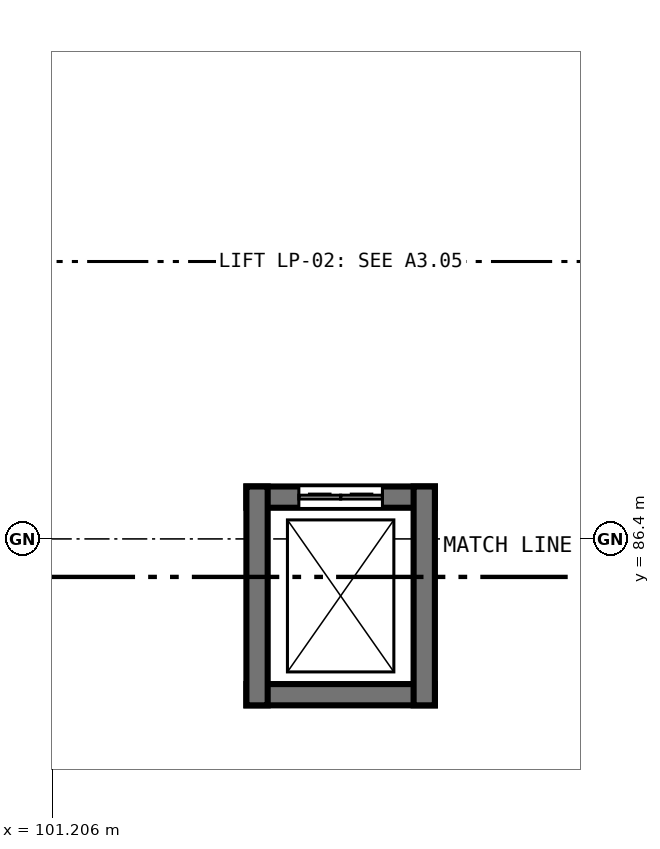
"""IFC4 building model, lengths in metres.
Left out: names, types, materials, properties, quantities, classifications, styles, units other than length and angle.
Written with IfcOpenShell. Run it as: python <this file> out.ifc"""

import sys

from ifc_helpers import new_model, si_unit, direction, frame, frame_2d, origin, place, context, subcontext, project, spatial, rectangle, extrude, element, fill, save


model = new_model("IFC4")
c1 = context("Model", 3, precision=1e-05, world=origin(), true_north=direction((0.0, 1.0)))
c2 = subcontext(c1, "Body", "Model", "MODEL_VIEW")
j1 = project(units=[si_unit("LENGTHUNIT", "METRE"), si_unit("PLANEANGLEUNIT", "RADIAN")], contexts=[c1])
p1 = place(None, origin())
s1 = spatial("IfcSite", under=j1, at=p1, CompositionType="ELEMENT")
p2 = place(p1, origin())
s2 = spatial("IfcBuilding", under=s1, at=p2, CompositionType="ELEMENT")
p3 = place(p2, frame((0.0, 0.0, -4.8)))
s3 = spatial("IfcBuildingStorey", under=s2, at=p3, CompositionType="ELEMENT", Elevation=-4.8)
p4 = place(p3, frame((106.24, 84.35, 0.0), z_axis=(0.0, 0.0, 1.0), x_axis=(-1.0, 0.0, 0.0)))
e1 = element("IfcWall", 1, at=p4, inside=s3, PredefinedType="SHEAR", context=c2, shape_type="SweptSolid", body=[
    extrude(rectangle(XDim=2.48, YDim=0.28, at=frame_2d((1.24, 0.0))), origin(), (0.0, 0.0, 1.0), 4.5),
])
p5 = place(p3, frame((103.76, 86.95, 0.0), z_axis=(0.0, 0.0, 1.0), x_axis=(1.0, 0.0, 0.0)))
e2 = element("IfcWall", 2, at=p5, inside=s3, PredefinedType="SHEAR", context=c2, shape_type="SweptSolid", body=[
    extrude(rectangle(XDim=2.48, YDim=0.28, at=frame_2d((1.24, 0.0))), origin(), (0.0, 0.0, 1.0), 4.5),
])
p6 = place(p5, frame((0.69, 0.0, 0.0)))
e3 = element("IfcOpeningElement", 3, at=p6, cuts=e2, PredefinedType="OPENING", context=c2, shape_type="SweptSolid", body=[
    extrude(rectangle(XDim=1.1, YDim=2.15, at=frame_2d((0.55, 1.075))), frame((0.0, 0.15, 0.0), z_axis=(0.0, -1.0, 0.0), x_axis=(1.0, 0.0, 0.0)), (0.0, 0.0, 1.0), 0.3),
])
for number, where, z_axis, x_axis in (
    (4, (103.9, 84.21, 0.0), (0.0, 0.0, 1.0), (0.0, 1.0, 0.0)),
    (5, (106.1, 87.09, 0.0), (0.0, 0.0, 1.0), (0.0, -1.0, 0.0)),
):
    element("IfcWall", number, at=place(p3, frame(where, z_axis=z_axis, x_axis=x_axis)), inside=s3, PredefinedType="SHEAR", context=c2, shape_type="SweptSolid", body=[
        extrude(rectangle(XDim=2.88, YDim=0.28, at=frame_2d((1.44, 0.0))), origin(), (0.0, 0.0, 1.0), 4.5),
    ])
p7 = place(p6, origin())
e6 = element("IfcDoor", 6, at=p7, inside=s3, OperationType="DOUBLE_DOOR_SLIDING", PredefinedType="DOOR", context=c2, shape_type="SweptSolid", body=[
    extrude(rectangle(XDim=1.1, YDim=2.15, at=frame_2d((0.55, 1.075))), frame((0.0, 0.025, 0.0), z_axis=(0.0, -1.0, 0.0), x_axis=(1.0, 0.0, 0.0)), (0.0, 0.0, 1.0), 0.05),
])
fill(e3, e6)
save(model, sys.argv[1])
